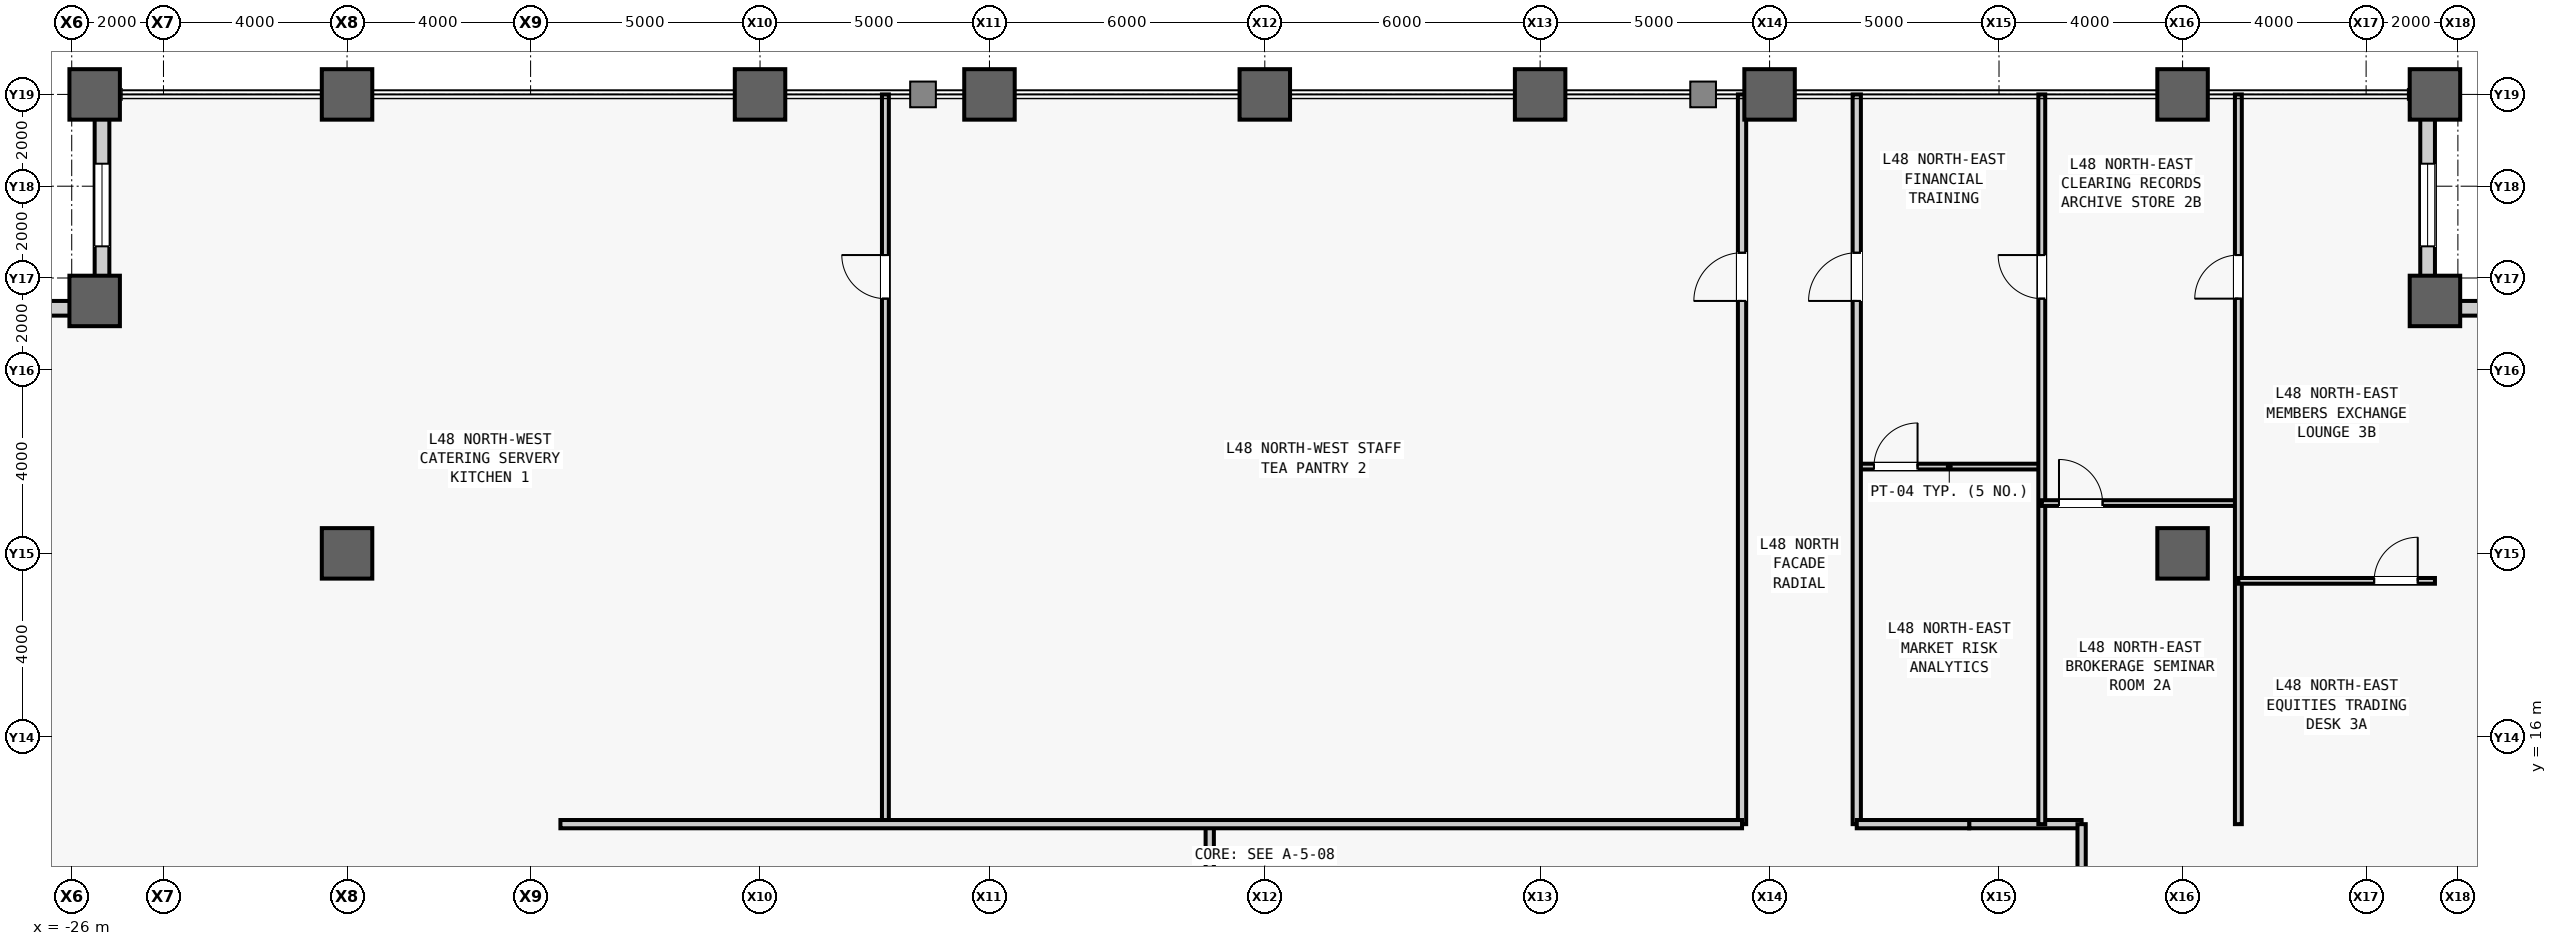
"""IFC4 building model, lengths in metres.
Left out: names, types, materials, properties, quantities, classifications, styles, units other than length and angle.
Written with IfcOpenShell. Run it as: python <this file> out.ifc"""

import sys

from ifc_helpers import new_model, si_unit, direction, frame, frame_2d, origin, origin_2d, place, context, subcontext, project, spatial, rectangle, hollow_rectangle, extrude, source, transform, mapped, element, fill, save


model = new_model("IFC4")
c1 = context("Model", 3, precision=1e-05, world=origin(), true_north=direction((0.0, 1.0)))
c2 = subcontext(c1, "Body", "Model", "MODEL_VIEW")
j1 = project(units=[si_unit("LENGTHUNIT", "METRE"), si_unit("PLANEANGLEUNIT", "RADIAN")], contexts=[c1])
p1 = place(None, origin())
s1 = spatial("IfcSite", under=j1, at=p1, CompositionType="ELEMENT")
p2 = place(p1, origin())
s2 = spatial("IfcBuilding", under=s1, at=p2, CompositionType="ELEMENT")
p3 = place(p2, frame((0.0, 0.0, 207.1)))
s3 = spatial("IfcBuildingStorey", under=s2, at=p3, CompositionType="ELEMENT", Elevation=207.1)
m1 = source(origin(), c2, "Body", "SweptSolid", [
    extrude(hollow_rectangle(XDim=1.1, YDim=1.1, WallThickness=0.06, at=origin_2d()), origin(), (0.0, 0.0, 1.0), 4.0),
])
for number, where, z_axis, x_axis in (
    (1, (-25.5, 25.5, 0.0), (0.0, 0.0, 1.0), (1.0, 0.0, 0.0)),
    (2, (-25.5, 30.0, 0.0), (0.0, 0.0, 1.0), (1.0, 0.0, 0.0)),
    (3, (-20.0, 20.0, 0.0), (0.0, 0.0, 1.0), (1.0, 0.0, 0.0)),
    (4, (-20.0, 30.0, 0.0), (0.0, 0.0, 1.0), (1.0, 0.0, 0.0)),
    (5, (-11.0, 30.0, 0.0), (0.0, 0.0, 1.0), (1.0, 0.0, 0.0)),
    (6, (-6.0, 30.0, 0.0), (0.0, 0.0, 1.0), (1.0, 0.0, 0.0)),
    (7, (0.0, 30.0, 0.0), (0.0, 0.0, 1.0), (1.0, 0.0, 0.0)),
    (8, (6.0, 30.0, 0.0), (0.0, 0.0, 1.0), (1.0, 0.0, 0.0)),
    (9, (11.0, 30.0, 0.0), (0.0, 0.0, 1.0), (1.0, 0.0, 0.0)),
    (10, (20.0, 20.0, 0.0), (0.0, 0.0, 1.0), (1.0, 0.0, 0.0)),
    (11, (20.0, 30.0, 0.0), (0.0, 0.0, 1.0), (1.0, 0.0, 0.0)),
    (12, (25.5, 25.5, 0.0), (0.0, 0.0, 1.0), (1.0, 0.0, 0.0)),
    (13, (25.5, 30.0, 0.0), (0.0, 0.0, 1.0), (1.0, 0.0, 0.0)),
):
    element("IfcColumn", number, at=place(p3, frame(where, z_axis=z_axis, x_axis=x_axis)), inside=s3, PredefinedType="COLUMN", context=c2, shape_type="MappedRepresentation", body=[
        mapped(m1, transform((0.0, 0.0, 0.0), scale=1.0)),
    ])
m2 = source(origin(), c2, "Body", "SweptSolid", [
    extrude(rectangle(XDim=4.18, YDim=0.32, at=frame_2d((2.09, 0.0))), origin(), (0.0, 0.0, 1.0), 3.164),
])
p4 = place(p3, frame((25.5, 25.34, 0.0), z_axis=(0.0, 0.0, 1.0), x_axis=(1.0, 0.0, 0.0)))
e14 = element("IfcWall", 14, at=p4, inside=s3, PredefinedType="STANDARD", context=c2, shape_type="MappedRepresentation", body=[
    mapped(m2, transform((0.0, 0.0, 0.0), scale=1.0)),
])
m3 = source(origin(), c2, "Body", "SweptSolid", [
    extrude(rectangle(XDim=1.8, YDim=2.4, at=frame_2d((0.9, 1.2))), frame((0.0, 0.17, 0.0), z_axis=(0.0, -1.0, 0.0), x_axis=(1.0, 0.0, 0.0)), (0.0, 0.0, 1.0), 0.34),
])
p5 = place(p4, frame((1.19, 0.0, 0.5)))
e15 = element("IfcOpeningElement", 15, at=p5, cuts=e14, PredefinedType="OPENING", context=c2, shape_type="MappedRepresentation", body=[
    mapped(m3, transform((0.0, 0.0, 0.0), scale=1.0)),
])
m4 = source(origin(), c2, "Body", "SweptSolid", [
    extrude(rectangle(XDim=4.18, YDim=0.32, at=frame_2d((2.09, 0.0))), origin(), (0.0, 0.0, 1.0), 2.38),
])
p6 = place(p3, frame((25.34, 25.5, 0.0), z_axis=(0.0, 0.0, 1.0), x_axis=(0.0, 1.0, 0.0)))
e16 = element("IfcWall", 16, at=p6, inside=s3, PredefinedType="STANDARD", context=c2, shape_type="MappedRepresentation", body=[
    mapped(m4, transform((0.0, 0.0, 0.0), scale=1.0)),
])
m5 = source(origin(), c2, "Body", "SweptSolid", [
    extrude(rectangle(XDim=1.8, YDim=1.66, at=frame_2d((0.9, 0.83))), frame((0.0, 0.17, 0.0), z_axis=(0.0, -1.0, 0.0), x_axis=(1.0, 0.0, 0.0)), (0.0, 0.0, 1.0), 0.34),
])
p7 = place(p6, frame((1.19, 0.0, 0.5)))
e17 = element("IfcOpeningElement", 17, at=p7, cuts=e16, PredefinedType="OPENING", context=c2, shape_type="MappedRepresentation", body=[
    mapped(m5, transform((0.0, 0.0, 0.0), scale=1.0)),
])
p8 = place(p3, frame((-25.34, 25.5, 0.0), z_axis=(0.0, 0.0, 1.0), x_axis=(0.0, 1.0, 0.0)))
e18 = element("IfcWall", 18, at=p8, inside=s3, PredefinedType="STANDARD", context=c2, shape_type="MappedRepresentation", body=[
    mapped(m4, transform((0.0, 0.0, 0.0), scale=1.0)),
])
p9 = place(p8, frame((1.19, 0.0, 0.5)))
e19 = element("IfcOpeningElement", 19, at=p9, cuts=e18, PredefinedType="OPENING", context=c2, shape_type="MappedRepresentation", body=[
    mapped(m5, transform((0.0, 0.0, 0.0), scale=1.0)),
])
p10 = place(p3, frame((-25.5, 25.34, 0.0), z_axis=(0.0, 0.0, 1.0), x_axis=(-1.0, 0.0, 0.0)))
e20 = element("IfcWall", 20, at=p10, inside=s3, PredefinedType="STANDARD", context=c2, shape_type="MappedRepresentation", body=[
    mapped(m2, transform((0.0, 0.0, 0.0), scale=1.0)),
])
p11 = place(p10, frame((1.19, 0.0, 0.5)))
e21 = element("IfcOpeningElement", 21, at=p11, cuts=e20, PredefinedType="OPENING", context=c2, shape_type="MappedRepresentation", body=[
    mapped(m3, transform((0.0, 0.0, 0.0), scale=1.0)),
])
m6 = source(origin(), c2, "Body", "SweptSolid", [
    extrude(rectangle(XDim=2.45, YDim=0.18, at=frame_2d((1.225, 0.0))), origin(), (0.0, 0.0, 1.0), 3.78),
])
p12 = place(p3, frame((15.35, 14.1, 0.0), z_axis=(0.0, 0.0, 1.0), x_axis=(1.0, 0.0, 0.0)))
e22 = element("IfcWall", 22, at=p12, inside=s3, PredefinedType="PARTITIONING", context=c2, shape_type="MappedRepresentation", body=[
    mapped(m6, transform((0.0, 0.0, 0.0), scale=1.0)),
])
m7 = source(origin(), c2, "Body", "SweptSolid", [
    extrude(rectangle(XDim=3.1, YDim=0.18, at=frame_2d((1.55, 0.0))), origin(), (0.0, 0.0, 1.0), 3.78),
])
p13 = place(p3, frame((-1.2, 11.0, 0.0), z_axis=(0.0, 0.0, 1.0), x_axis=(0.0, 1.0, 0.0)))
e23 = element("IfcWall", 23, at=p13, inside=s3, PredefinedType="PARTITIONING", context=c2, shape_type="MappedRepresentation", body=[
    mapped(m7, transform((0.0, 0.0, 0.0), scale=1.0)),
])
m8 = source(origin(), c2, "Body", "SweptSolid", [
    extrude(rectangle(XDim=15.9, YDim=0.15, at=frame_2d((7.95, 0.0))), origin(), (0.0, 0.0, 1.0), 3.78),
])
p14 = place(p3, frame((-8.268, 14.1, 0.0), z_axis=(0.0, 0.0, 1.0), x_axis=(0.0, 1.0, 0.0)))
e24 = element("IfcWall", 24, at=p14, inside=s3, PredefinedType="PARTITIONING", context=c2, shape_type="MappedRepresentation", body=[
    mapped(m8, transform((0.0, 0.0, 0.0), scale=1.0)),
])
m9 = source(origin(), c2, "Body", "SweptSolid", [
    extrude(rectangle(XDim=0.95, YDim=2.15, at=frame_2d((0.475, 1.075))), frame((0.0, 0.085, 0.0), z_axis=(0.0, -1.0, 0.0), x_axis=(1.0, 0.0, 0.0)), (0.0, 0.0, 1.0), 0.17),
])
p15 = place(p14, frame((11.45, 0.0, 0.0)))
e25 = element("IfcOpeningElement", 25, at=p15, cuts=e24, PredefinedType="OPENING", context=c2, shape_type="MappedRepresentation", body=[
    mapped(m9, transform((0.0, 0.0, 0.0), scale=1.0)),
])
m10 = source(origin(), c2, "Body", "SweptSolid", [
    extrude(rectangle(XDim=15.9, YDim=0.18, at=frame_2d((7.95, 0.0))), origin(), (0.0, 0.0, 1.0), 3.78),
])
p16 = place(p3, frame((10.4, 14.1, 0.0), z_axis=(0.0, 0.0, 1.0), x_axis=(0.0, 1.0, 0.0)))
e26 = element("IfcWall", 26, at=p16, inside=s3, PredefinedType="PARTITIONING", context=c2, shape_type="MappedRepresentation", body=[
    mapped(m10, transform((0.0, 0.0, 0.0), scale=1.0)),
])
m11 = source(origin(), c2, "Body", "SweptSolid", [
    extrude(rectangle(XDim=1.05, YDim=2.2, at=frame_2d((0.525, 1.1))), frame((0.0, 0.1, 0.0), z_axis=(0.0, -1.0, 0.0), x_axis=(1.0, 0.0, 0.0)), (0.0, 0.0, 1.0), 0.2),
])
p17 = place(p16, frame((11.4, 0.0, 0.0)))
e27 = element("IfcOpeningElement", 27, at=p17, cuts=e26, PredefinedType="OPENING", context=c2, shape_type="MappedRepresentation", body=[
    mapped(m11, transform((0.0, 0.0, 0.0), scale=1.0)),
])
m12 = source(origin(), c2, "Body", "SweptSolid", [
    extrude(rectangle(XDim=25.75, YDim=0.18, at=frame_2d((12.875, 0.0))), origin(), (0.0, 0.0, 1.0), 3.78),
])
p18 = place(p3, frame((-15.35, 14.1, 0.0), z_axis=(0.0, 0.0, 1.0), x_axis=(1.0, 0.0, 0.0)))
e28 = element("IfcWall", 28, at=p18, inside=s3, PredefinedType="PARTITIONING", context=c2, shape_type="MappedRepresentation", body=[
    mapped(m12, transform((0.0, 0.0, 0.0), scale=1.0)),
])
m13 = source(origin(), c2, "Body", "SweptSolid", [
    extrude(rectangle(XDim=4.032, YDim=0.125, at=frame_2d((2.016, 0.0))), origin(), (0.0, 0.0, 1.0), 3.78),
])
p19 = place(p3, frame((12.9, 21.891, 0.0), z_axis=(0.0, 0.0, 1.0), x_axis=(1.0, 0.0, 0.0)))
e29 = element("IfcWall", 29, at=p19, inside=s3, PredefinedType="PARTITIONING", context=c2, shape_type="MappedRepresentation", body=[
    mapped(m13, transform((0.0, 0.0, 0.0), scale=1.0)),
])
m14 = source(origin(), c2, "Body", "SweptSolid", [
    extrude(rectangle(XDim=0.95, YDim=2.15, at=frame_2d((0.475, 1.075))), frame((0.0, 0.073, 0.0), z_axis=(0.0, -1.0, 0.0), x_axis=(1.0, 0.0, 0.0)), (0.0, 0.0, 1.0), 0.145),
])
p20 = place(p19, frame((0.375, 0.0, 0.0)))
e30 = element("IfcOpeningElement", 30, at=p20, cuts=e29, PredefinedType="OPENING", context=c2, shape_type="MappedRepresentation", body=[
    mapped(m14, transform((0.0, 0.0, 0.0), scale=1.0)),
])
p21 = place(p3, frame((16.932, 14.1, 0.0), z_axis=(0.0, 0.0, 1.0), x_axis=(0.0, 1.0, 0.0)))
e31 = element("IfcWall", 31, at=p21, inside=s3, PredefinedType="PARTITIONING", context=c2, shape_type="MappedRepresentation", body=[
    mapped(m8, transform((0.0, 0.0, 0.0), scale=1.0)),
])
p22 = place(p21, frame((11.45, 0.0, 0.0)))
e32 = element("IfcOpeningElement", 32, at=p22, cuts=e31, PredefinedType="OPENING", context=c2, shape_type="MappedRepresentation", body=[
    mapped(m9, transform((0.0, 0.0, 0.0), scale=1.0)),
])
m15 = source(origin(), c2, "Body", "SweptSolid", [
    extrude(rectangle(XDim=4.284, YDim=0.125, at=frame_2d((2.142, 0.0))), origin(), (0.0, 0.0, 1.0), 3.78),
])
p23 = place(p3, frame((16.932, 21.096, 0.0), z_axis=(0.0, 0.0, 1.0), x_axis=(1.0, 0.0, 0.0)))
e33 = element("IfcWall", 33, at=p23, inside=s3, PredefinedType="PARTITIONING", context=c2, shape_type="MappedRepresentation", body=[
    mapped(m15, transform((0.0, 0.0, 0.0), scale=1.0)),
])
p24 = place(p23, frame((0.375, 0.0, 0.0)))
e34 = element("IfcOpeningElement", 34, at=p24, cuts=e33, PredefinedType="OPENING", context=c2, shape_type="MappedRepresentation", body=[
    mapped(m14, transform((0.0, 0.0, 0.0), scale=1.0)),
])
p25 = place(p3, frame((21.216, 14.1, 0.0), z_axis=(0.0, 0.0, 1.0), x_axis=(0.0, 1.0, 0.0)))
e35 = element("IfcWall", 35, at=p25, inside=s3, PredefinedType="PARTITIONING", context=c2, shape_type="MappedRepresentation", body=[
    mapped(m8, transform((0.0, 0.0, 0.0), scale=1.0)),
])
p26 = place(p25, frame((11.45, 0.0, 0.0)))
e36 = element("IfcOpeningElement", 36, at=p26, cuts=e35, PredefinedType="OPENING", context=c2, shape_type="MappedRepresentation", body=[
    mapped(m9, transform((0.0, 0.0, 0.0), scale=1.0)),
])
m16 = source(origin(), c2, "Body", "SweptSolid", [
    extrude(rectangle(XDim=4.284, YDim=0.125, at=frame_2d((2.142, 0.0))), origin(), (0.0, 0.0, 1.0), 3.363),
])
p27 = place(p3, frame((21.216, 19.401, 0.0), z_axis=(0.0, 0.0, 1.0), x_axis=(1.0, 0.0, 0.0)))
e37 = element("IfcWall", 37, at=p27, inside=s3, PredefinedType="PARTITIONING", context=c2, shape_type="MappedRepresentation", body=[
    mapped(m16, transform((0.0, 0.0, 0.0), scale=1.0)),
])
p28 = place(p27, frame((2.959, 0.0, 0.0)))
e38 = element("IfcOpeningElement", 38, at=p28, cuts=e37, PredefinedType="OPENING", context=c2, shape_type="MappedRepresentation", body=[
    mapped(m14, transform((0.0, 0.0, 0.0), scale=1.0)),
])
p29 = place(p3, frame((12.9, 14.1, 0.0), z_axis=(0.0, 0.0, 1.0), x_axis=(0.0, 1.0, 0.0)))
e39 = element("IfcWall", 39, at=p29, inside=s3, PredefinedType="PARTITIONING", context=c2, shape_type="MappedRepresentation", body=[
    mapped(m10, transform((0.0, 0.0, 0.0), scale=1.0)),
])
p30 = place(p29, frame((11.4, 0.0, 0.0)))
e40 = element("IfcOpeningElement", 40, at=p30, cuts=e39, PredefinedType="OPENING", context=c2, shape_type="MappedRepresentation", body=[
    mapped(m11, transform((0.0, 0.0, 0.0), scale=1.0)),
])
m17 = source(origin(), c2, "Body", "SweptSolid", [
    extrude(rectangle(XDim=2.45, YDim=0.18, at=frame_2d((1.225, 0.0))), origin(), (0.0, 0.0, 1.0), 3.78),
])
p31 = place(p3, frame((12.9, 14.1, 0.0), z_axis=(0.0, 0.0, 1.0), x_axis=(1.0, 0.0, 0.0)))
e41 = element("IfcWall", 41, at=p31, inside=s3, PredefinedType="PARTITIONING", context=c2, shape_type="MappedRepresentation", body=[
    mapped(m17, transform((0.0, 0.0, 0.0), scale=1.0)),
])
m18 = source(origin(), c2, "Body", "SweptSolid", [
    extrude(rectangle(XDim=10.0, YDim=0.18, at=frame_2d((5.0, 0.0))), origin(), (0.0, 0.0, 1.0), 3.78),
])
p32 = place(p3, frame((17.8, 4.1, 0.0), z_axis=(0.0, 0.0, 1.0), x_axis=(0.0, 1.0, 0.0)))
e42 = element("IfcWall", 42, at=p32, inside=s3, PredefinedType="PARTITIONING", context=c2, shape_type="MappedRepresentation", body=[
    mapped(m18, transform((0.0, 0.0, 0.0), scale=1.0)),
])
m19 = source(origin(), c2, "Body", "SweptSolid", [
    extrude(rectangle(XDim=1.8, YDim=1.66, at=frame_2d((0.9, 0.83))), frame((0.0, 0.03, 0.0), z_axis=(0.0, -1.0, 0.0), x_axis=(1.0, 0.0, 0.0)), (0.0, 0.0, 1.0), 0.06),
])
p33 = place(p7, origin())
e43 = element("IfcWindow", 43, at=p33, inside=s3, PartitioningType="SINGLE_PANEL", PredefinedType="WINDOW", context=c2, shape_type="MappedRepresentation", body=[
    mapped(m19, transform((0.0, 0.0, 0.0), scale=1.0)),
])
fill(e17, e43)
p34 = place(p9, origin())
e44 = element("IfcWindow", 44, at=p34, inside=s3, PartitioningType="SINGLE_PANEL", PredefinedType="WINDOW", context=c2, shape_type="MappedRepresentation", body=[
    mapped(m19, transform((0.0, 0.0, 0.0), scale=1.0)),
])
fill(e19, e44)
m20 = source(origin(), c2, "Body", "SweptSolid", [
    extrude(rectangle(XDim=0.95, YDim=2.15, at=frame_2d((0.475, 1.075))), frame((0.0, 0.025, 0.0), z_axis=(0.0, -1.0, 0.0), x_axis=(1.0, 0.0, 0.0)), (0.0, 0.0, 1.0), 0.05),
])
p35 = place(p15, origin())
e45 = element("IfcDoor", 45, at=p35, inside=s3, OperationType="SINGLE_SWING_RIGHT", PredefinedType="DOOR", context=c2, shape_type="MappedRepresentation", body=[
    mapped(m20, transform((0.0, 0.0, 0.0), scale=1.0)),
])
fill(e25, e45)
m21 = source(origin(), c2, "Body", "SweptSolid", [
    extrude(rectangle(XDim=1.05, YDim=2.2, at=frame_2d((0.525, 1.1))), frame((0.0, 0.025, 0.0), z_axis=(0.0, -1.0, 0.0), x_axis=(1.0, 0.0, 0.0)), (0.0, 0.0, 1.0), 0.05),
])
p36 = place(p17, origin())
e46 = element("IfcDoor", 46, at=p36, inside=s3, OperationType="SINGLE_SWING_LEFT", PredefinedType="DOOR", context=c2, shape_type="MappedRepresentation", body=[
    mapped(m21, transform((0.0, 0.0, 0.0), scale=1.0)),
])
fill(e27, e46)
p37 = place(p20, origin())
e47 = element("IfcDoor", 47, at=p37, inside=s3, OperationType="SINGLE_SWING_RIGHT", PredefinedType="DOOR", context=c2, shape_type="MappedRepresentation", body=[
    mapped(m20, transform((0.0, 0.0, 0.0), scale=1.0)),
])
fill(e30, e47)
p38 = place(p22, origin())
e48 = element("IfcDoor", 48, at=p38, inside=s3, OperationType="SINGLE_SWING_RIGHT", PredefinedType="DOOR", context=c2, shape_type="MappedRepresentation", body=[
    mapped(m20, transform((0.0, 0.0, 0.0), scale=1.0)),
])
fill(e32, e48)
p39 = place(p24, origin())
e49 = element("IfcDoor", 49, at=p39, inside=s3, OperationType="SINGLE_SWING_LEFT", PredefinedType="DOOR", context=c2, shape_type="MappedRepresentation", body=[
    mapped(m20, transform((0.0, 0.0, 0.0), scale=1.0)),
])
fill(e34, e49)
p40 = place(p26, origin())
e50 = element("IfcDoor", 50, at=p40, inside=s3, OperationType="SINGLE_SWING_LEFT", PredefinedType="DOOR", context=c2, shape_type="MappedRepresentation", body=[
    mapped(m20, transform((0.0, 0.0, 0.0), scale=1.0)),
])
fill(e36, e50)
p41 = place(p28, origin())
e51 = element("IfcDoor", 51, at=p41, inside=s3, OperationType="SINGLE_SWING_RIGHT", PredefinedType="DOOR", context=c2, shape_type="MappedRepresentation", body=[
    mapped(m20, transform((0.0, 0.0, 0.0), scale=1.0)),
])
fill(e38, e51)
p42 = place(p30, origin())
e52 = element("IfcDoor", 52, at=p42, inside=s3, OperationType="SINGLE_SWING_LEFT", PredefinedType="DOOR", context=c2, shape_type="MappedRepresentation", body=[
    mapped(m21, transform((0.0, 0.0, 0.0), scale=1.0)),
])
fill(e40, e52)
save(model, sys.argv[1])
